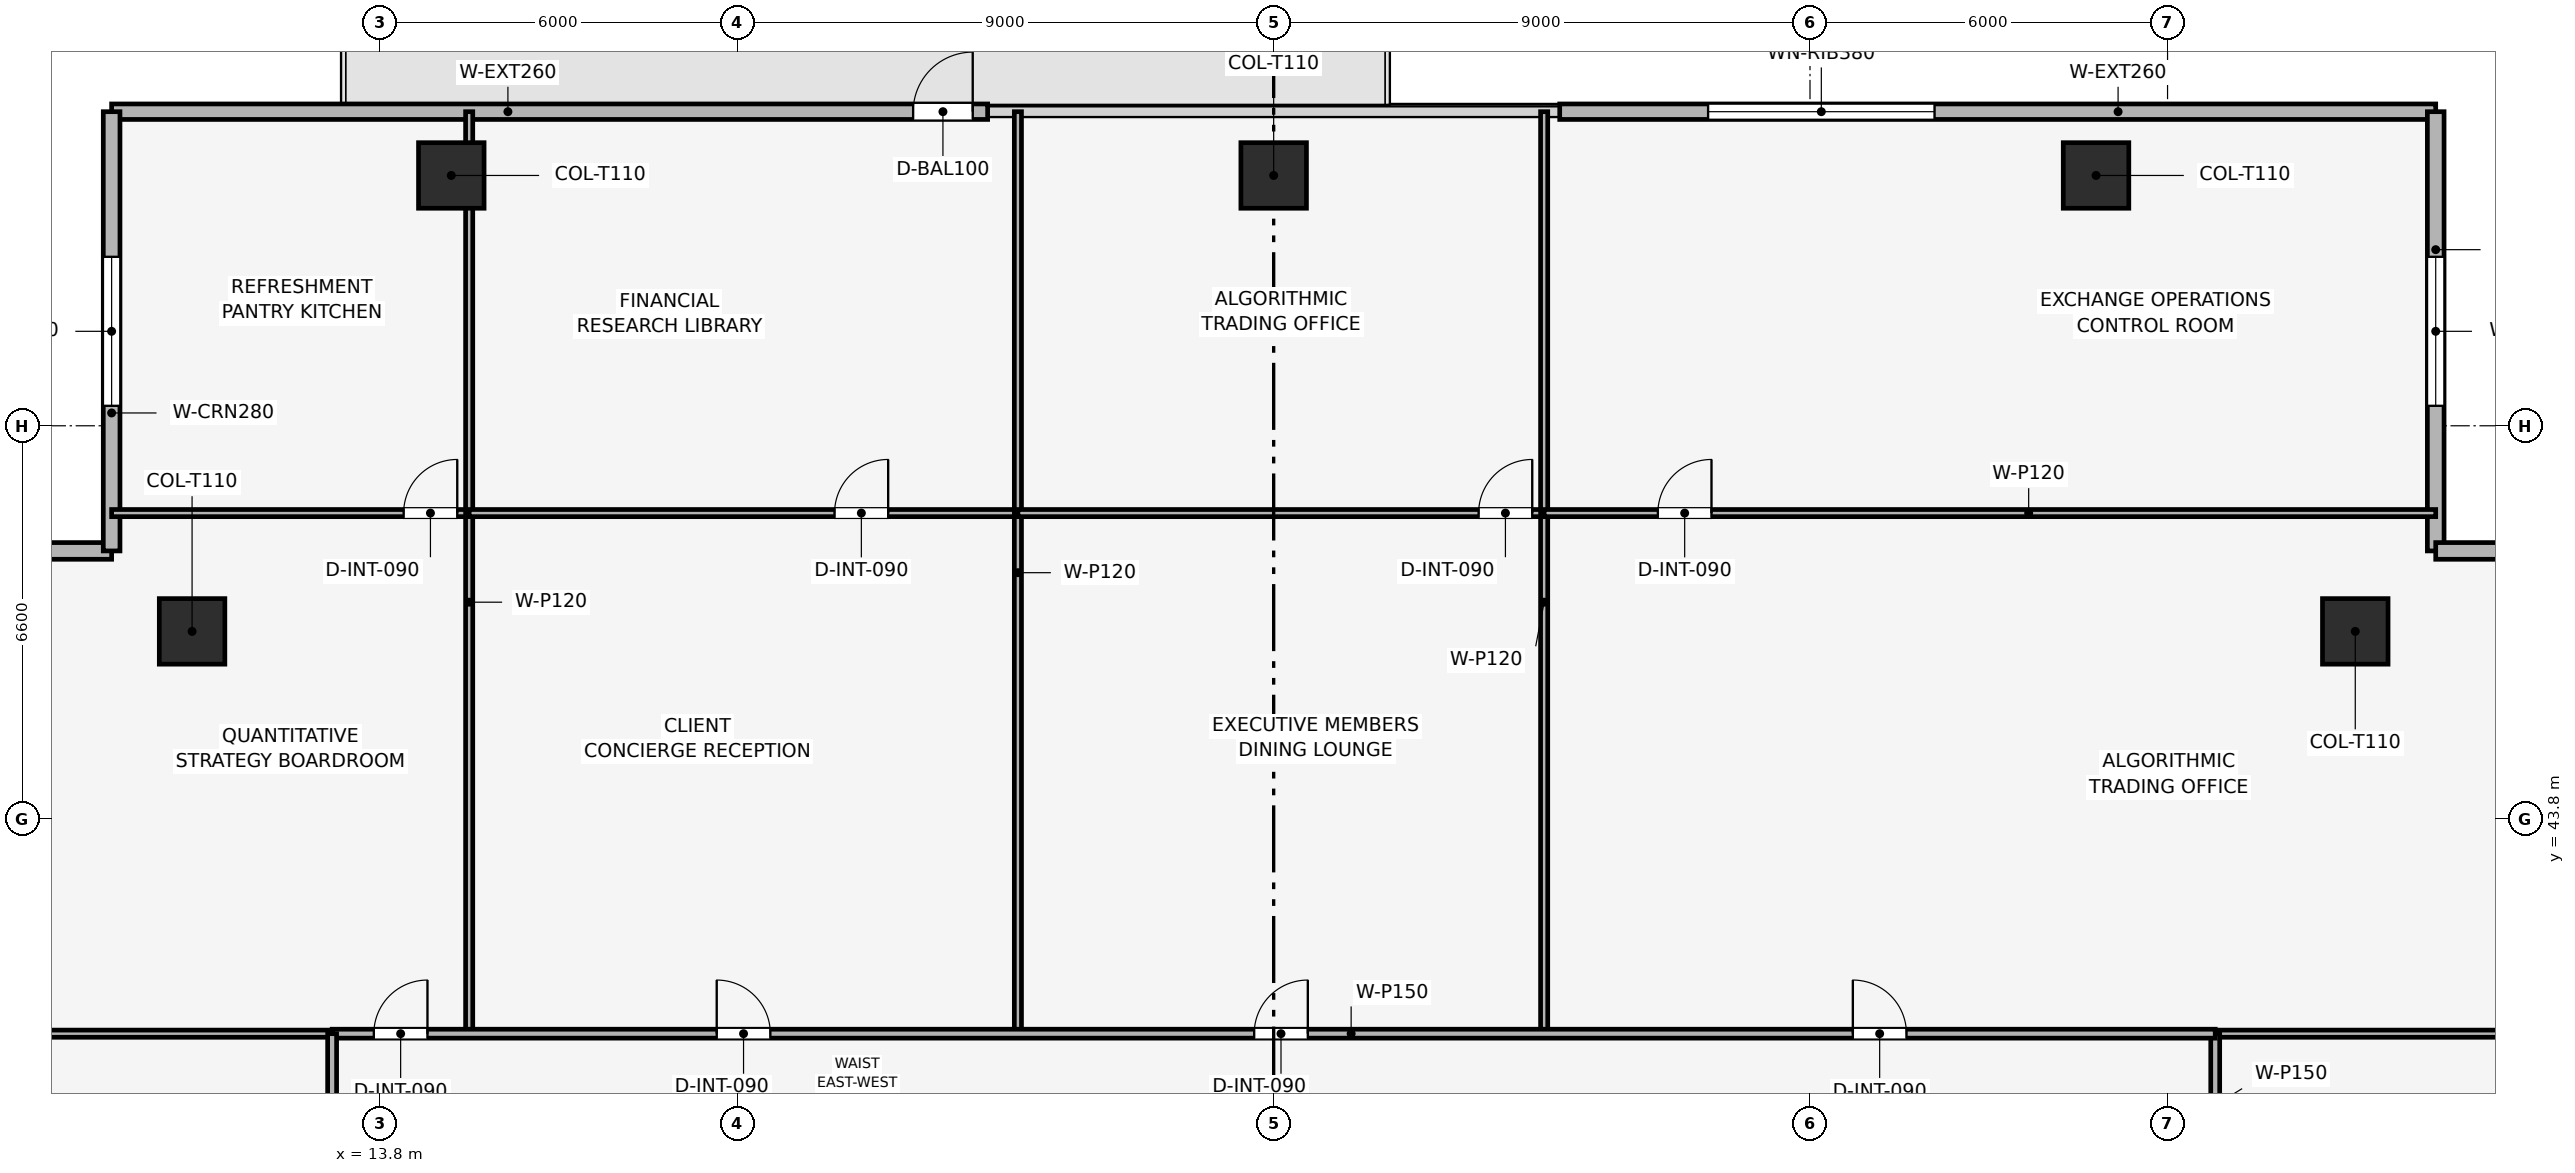
"""IFC4 building model, lengths in metres.
Left out: names, types, materials, properties, quantities, classifications, styles, units other than length and angle.
Written with IfcOpenShell. Run it as: python <this file> out.ifc"""

import sys

from ifc_helpers import new_model, si_unit, direction, frame, frame_2d, origin, origin_2d, place, context, subcontext, project, spatial, rectangle, extrude, element, fill, save


model = new_model("IFC4")
c1 = context("Model", 3, precision=1e-05, world=origin(), true_north=direction((0.0, 1.0)))
c2 = subcontext(c1, "Body", "Model", "MODEL_VIEW")
j1 = project(units=[si_unit("LENGTHUNIT", "METRE"), si_unit("PLANEANGLEUNIT", "RADIAN")], contexts=[c1])
p1 = place(None, origin())
s1 = spatial("IfcSite", under=j1, at=p1, CompositionType="ELEMENT")
p2 = place(p1, origin())
s2 = spatial("IfcBuilding", under=s1, at=p2, CompositionType="ELEMENT")
p3 = place(p2, frame((0.0, 0.0, 233.7)))
s3 = spatial("IfcBuildingStorey", under=s2, at=p3, CompositionType="ELEMENT", Elevation=233.7)
for number, where, z_axis, x_axis in (
    (1, (42.6, 54.6, 0.003), (0.0, 0.0, 1.0), (1.0, 0.0, 0.0)),
    (2, (28.8, 54.6, 0.003), (0.0, 0.0, 1.0), (1.0, 0.0, 0.0)),
    (3, (15.0, 54.6, 0.003), (0.0, 0.0, 1.0), (1.0, 0.0, 0.0)),
    (4, (46.95, 46.95, 0.003), (0.0, 0.0, 1.0), (1.0, 0.0, 0.0)),
    (5, (10.65, 46.95, 0.003), (0.0, 0.0, 1.0), (1.0, 0.0, 0.0)),
):
    element("IfcColumn", number, at=place(p3, frame(where, z_axis=z_axis, x_axis=x_axis)), inside=s3, PredefinedType="COLUMN", context=c2, shape_type="SweptSolid", body=[
        extrude(rectangle(XDim=1.1, YDim=1.1, at=origin_2d()), origin(), (0.0, 0.0, 1.0), 3.494),
    ])
p4 = place(p3, frame((9.3, 55.67, 0.0), z_axis=(0.0, 0.0, 1.0), x_axis=(1.0, 0.0, 0.0)))
e6 = element("IfcWall", 6, at=p4, inside=s3, PredefinedType="SOLIDWALL", context=c2, shape_type="SweptSolid", body=[
    extrude(rectangle(XDim=14.7, YDim=0.26, at=frame_2d((7.35, 0.0))), origin(), (0.0, 0.0, 1.0), 3.5),
])
p5 = place(p4, frame((13.45, 0.0, 0.0)))
e7 = element("IfcOpeningElement", 7, at=p5, cuts=e6, PredefinedType="OPENING", context=c2, shape_type="SweptSolid", body=[
    extrude(rectangle(XDim=1.0, YDim=2.2, at=frame_2d((0.5, 1.1))), frame((0.0, 0.14, 0.0), z_axis=(0.0, -1.0, 0.0), x_axis=(1.0, 0.0, 0.0)), (0.0, 0.0, 1.0), 0.28),
])
p6 = place(p3, frame((33.6, 55.67, 0.0), z_axis=(0.0, 0.0, 1.0), x_axis=(1.0, 0.0, 0.0)))
e8 = element("IfcWall", 8, at=p6, inside=s3, PredefinedType="SOLIDWALL", context=c2, shape_type="SweptSolid", body=[
    extrude(rectangle(XDim=14.7, YDim=0.26, at=frame_2d((7.35, 0.0))), origin(), (0.0, 0.0, 1.0), 3.5),
])
p7 = place(p6, frame((2.49, 0.0, 0.9)))
e9 = element("IfcOpeningElement", 9, at=p7, cuts=e8, PredefinedType="OPENING", context=c2, shape_type="SweptSolid", body=[
    extrude(rectangle(XDim=3.8, YDim=1.9, at=frame_2d((1.9, 0.95))), frame((0.0, 0.14, 0.0), z_axis=(0.0, -1.0, 0.0), x_axis=(1.0, 0.0, 0.0)), (0.0, 0.0, 1.0), 0.28),
])
p8 = place(p3, frame((1.93, 48.3, 0.0), z_axis=(0.0, 0.0, 1.0), x_axis=(1.0, 0.0, 0.0)))
e10 = element("IfcWall", 10, at=p8, inside=s3, PredefinedType="SOLIDWALL", context=c2, shape_type="SweptSolid", body=[
    extrude(rectangle(XDim=7.37, YDim=0.28, at=frame_2d((3.685, 0.0))), origin(), (0.0, 0.0, 1.0), 3.5),
])
p9 = place(p8, frame((2.435, 0.0, 0.9)))
e11 = element("IfcOpeningElement", 11, at=p9, cuts=e10, PredefinedType="OPENING", context=c2, shape_type="SweptSolid", body=[
    extrude(rectangle(XDim=2.5, YDim=1.9, at=frame_2d((1.25, 0.95))), frame((0.0, 0.15, 0.0), z_axis=(0.0, -1.0, 0.0), x_axis=(1.0, 0.0, 0.0)), (0.0, 0.0, 1.0), 0.3),
])
p10 = place(p3, frame((9.3, 48.3, 0.0), z_axis=(0.0, 0.0, 1.0), x_axis=(0.0, 1.0, 0.0)))
e12 = element("IfcWall", 12, at=p10, inside=s3, PredefinedType="SOLIDWALL", context=c2, shape_type="SweptSolid", body=[
    extrude(rectangle(XDim=7.37, YDim=0.28, at=frame_2d((3.685, 0.0))), origin(), (0.0, 0.0, 1.0), 3.5),
])
p11 = place(p10, frame((2.435, 0.0, 0.9)))
e13 = element("IfcOpeningElement", 13, at=p11, cuts=e12, PredefinedType="OPENING", context=c2, shape_type="SweptSolid", body=[
    extrude(rectangle(XDim=2.5, YDim=1.9, at=frame_2d((1.25, 0.95))), frame((0.0, 0.15, 0.0), z_axis=(0.0, -1.0, 0.0), x_axis=(1.0, 0.0, 0.0)), (0.0, 0.0, 1.0), 0.3),
])
p12 = place(p3, frame((48.3, 55.67, 0.0), z_axis=(0.0, 0.0, 1.0), x_axis=(0.0, -1.0, 0.0)))
e14 = element("IfcWall", 14, at=p12, inside=s3, PredefinedType="SOLIDWALL", context=c2, shape_type="SweptSolid", body=[
    extrude(rectangle(XDim=7.37, YDim=0.28, at=frame_2d((3.685, 0.0))), origin(), (0.0, 0.0, 1.0), 3.5),
])
p13 = place(p12, frame((2.435, 0.0, 0.9)))
e15 = element("IfcOpeningElement", 15, at=p13, cuts=e14, PredefinedType="OPENING", context=c2, shape_type="SweptSolid", body=[
    extrude(rectangle(XDim=2.5, YDim=1.9, at=frame_2d((1.25, 0.95))), frame((0.0, 0.15, 0.0), z_axis=(0.0, -1.0, 0.0), x_axis=(1.0, 0.0, 0.0)), (0.0, 0.0, 1.0), 0.3),
])
p14 = place(p3, frame((48.3, 48.3, 0.0), z_axis=(0.0, 0.0, 1.0), x_axis=(1.0, 0.0, 0.0)))
e16 = element("IfcWall", 16, at=p14, inside=s3, PredefinedType="SOLIDWALL", context=c2, shape_type="SweptSolid", body=[
    extrude(rectangle(XDim=7.37, YDim=0.28, at=frame_2d((3.685, 0.0))), origin(), (0.0, 0.0, 1.0), 3.5),
])
p15 = place(p14, frame((2.435, 0.0, 0.9)))
e17 = element("IfcOpeningElement", 17, at=p15, cuts=e16, PredefinedType="OPENING", context=c2, shape_type="SweptSolid", body=[
    extrude(rectangle(XDim=2.5, YDim=1.9, at=frame_2d((1.25, 0.95))), frame((0.0, 0.15, 0.0), z_axis=(0.0, -1.0, 0.0), x_axis=(1.0, 0.0, 0.0)), (0.0, 0.0, 1.0), 0.3),
])
p16 = place(p3, frame((9.3, 48.935, 0.0), z_axis=(0.0, 0.0, 1.0), x_axis=(1.0, 0.0, 0.0)))
e18 = element("IfcWall", 18, at=p16, inside=s3, PredefinedType="PARTITIONING", context=c2, shape_type="SweptSolid", body=[
    extrude(rectangle(XDim=6.0, YDim=0.12, at=frame_2d((3.0, 0.0))), origin(), (0.0, 0.0, 1.0), 2.885),
])
p17 = place(p16, frame((4.9, 0.0, 0.0)))
e19 = element("IfcOpeningElement", 19, at=p17, cuts=e18, PredefinedType="OPENING", context=c2, shape_type="SweptSolid", body=[
    extrude(rectangle(XDim=0.9, YDim=2.1, at=frame_2d((0.45, 1.05))), frame((0.0, 0.07, 0.0), z_axis=(0.0, -1.0, 0.0), x_axis=(1.0, 0.0, 0.0)), (0.0, 0.0, 1.0), 0.14),
])
p18 = place(p3, frame((15.3, 40.2, 0.0), z_axis=(0.0, 0.0, 1.0), x_axis=(0.0, 1.0, 0.0)))
e20 = element("IfcWall", 20, at=p18, inside=s3, PredefinedType="PARTITIONING", context=c2, shape_type="SweptSolid", body=[
    extrude(rectangle(XDim=15.47, YDim=0.12, at=frame_2d((7.735, 0.0))), origin(), (0.0, 0.0, 1.0), 2.885),
])
p19 = place(p3, frame((15.3, 48.935, 0.0), z_axis=(0.0, 0.0, 1.0), x_axis=(1.0, 0.0, 0.0)))
e21 = element("IfcWall", 21, at=p19, inside=s3, PredefinedType="PARTITIONING", context=c2, shape_type="SweptSolid", body=[
    extrude(rectangle(XDim=9.208, YDim=0.12, at=frame_2d((4.604, 0.0))), origin(), (0.0, 0.0, 1.0), 3.035),
])
p20 = place(p19, frame((6.131, 0.0, 0.0)))
e22 = element("IfcOpeningElement", 22, at=p20, cuts=e21, PredefinedType="OPENING", context=c2, shape_type="SweptSolid", body=[
    extrude(rectangle(XDim=0.9, YDim=2.1, at=frame_2d((0.45, 1.05))), frame((0.0, 0.07, 0.0), z_axis=(0.0, -1.0, 0.0), x_axis=(1.0, 0.0, 0.0)), (0.0, 0.0, 1.0), 0.14),
])
p21 = place(p3, frame((24.508, 40.2, 0.0), z_axis=(0.0, 0.0, 1.0), x_axis=(0.0, 1.0, 0.0)))
e23 = element("IfcWall", 23, at=p21, inside=s3, PredefinedType="PARTITIONING", context=c2, shape_type="SweptSolid", body=[
    extrude(rectangle(XDim=15.47, YDim=0.12, at=frame_2d((7.735, 0.0))), origin(), (0.0, 0.0, 1.0), 2.885),
])
p22 = place(p3, frame((24.508, 48.935, 0.0), z_axis=(0.0, 0.0, 1.0), x_axis=(1.0, 0.0, 0.0)))
e24 = element("IfcWall", 24, at=p22, inside=s3, PredefinedType="PARTITIONING", context=c2, shape_type="SweptSolid", body=[
    extrude(rectangle(XDim=8.831, YDim=0.12, at=frame_2d((4.416, 0.0))), origin(), (0.0, 0.0, 1.0), 3.035),
])
p23 = place(p22, frame((7.731, 0.0, 0.0)))
e25 = element("IfcOpeningElement", 25, at=p23, cuts=e24, PredefinedType="OPENING", context=c2, shape_type="SweptSolid", body=[
    extrude(rectangle(XDim=0.9, YDim=2.1, at=frame_2d((0.45, 1.05))), frame((0.0, 0.07, 0.0), z_axis=(0.0, -1.0, 0.0), x_axis=(1.0, 0.0, 0.0)), (0.0, 0.0, 1.0), 0.14),
])
p24 = place(p3, frame((33.339, 40.2, 0.0), z_axis=(0.0, 0.0, 1.0), x_axis=(0.0, 1.0, 0.0)))
e26 = element("IfcWall", 26, at=p24, inside=s3, PredefinedType="PARTITIONING", context=c2, shape_type="SweptSolid", body=[
    extrude(rectangle(XDim=15.47, YDim=0.12, at=frame_2d((7.735, 0.0))), origin(), (0.0, 0.0, 1.0), 2.885),
])
p25 = place(p3, frame((33.339, 48.935, 0.0), z_axis=(0.0, 0.0, 1.0), x_axis=(1.0, 0.0, 0.0)))
e27 = element("IfcWall", 27, at=p25, inside=s3, PredefinedType="PARTITIONING", context=c2, shape_type="SweptSolid", body=[
    extrude(rectangle(XDim=14.961, YDim=0.12, at=frame_2d((7.48, 0.0))), origin(), (0.0, 0.0, 1.0), 2.885),
])
p26 = place(p25, frame((1.908, 0.0, 0.0)))
e28 = element("IfcOpeningElement", 28, at=p26, cuts=e27, PredefinedType="OPENING", context=c2, shape_type="SweptSolid", body=[
    extrude(rectangle(XDim=0.9, YDim=2.1, at=frame_2d((0.45, 1.05))), frame((0.0, 0.07, 0.0), z_axis=(0.0, -1.0, 0.0), x_axis=(1.0, 0.0, 0.0)), (0.0, 0.0, 1.0), 0.14),
])
p27 = place(p3, frame((1.93, 40.2, 0.0), z_axis=(0.0, 0.0, 1.0), x_axis=(1.0, 0.0, 0.0)))
e29 = element("IfcWall", 29, at=p27, inside=s3, PredefinedType="PARTITIONING", context=c2, shape_type="SweptSolid", body=[
    extrude(rectangle(XDim=11.07, YDim=0.12, at=frame_2d((5.535, 0.0))), origin(), (0.0, 0.0, 1.0), 2.885),
])
p28 = place(p3, frame((44.6, 40.2, 0.0), z_axis=(0.0, 0.0, 1.0), x_axis=(1.0, 0.0, 0.0)))
e30 = element("IfcWall", 30, at=p28, inside=s3, PredefinedType="PARTITIONING", context=c2, shape_type="SweptSolid", body=[
    extrude(rectangle(XDim=11.07, YDim=0.12, at=frame_2d((5.535, 0.0))), origin(), (0.0, 0.0, 1.0), 2.885),
])
p29 = place(p3, frame((44.6, 37.8, 0.0), z_axis=(0.0, 0.0, 1.0), x_axis=(0.0, 1.0, 0.0)))
e31 = element("IfcWall", 31, at=p29, inside=s3, PredefinedType="PARTITIONING", context=c2, shape_type="SweptSolid", body=[
    extrude(rectangle(XDim=2.4, YDim=0.15, at=frame_2d((1.2, 0.0))), origin(), (0.0, 0.0, 1.0), 3.5),
])
p30 = place(p3, frame((13.0, 40.2, 0.0), z_axis=(0.0, 0.0, 1.0), x_axis=(1.0, 0.0, 0.0)))
e32 = element("IfcWall", 32, at=p30, inside=s3, PredefinedType="PARTITIONING", context=c2, shape_type="SweptSolid", body=[
    extrude(rectangle(XDim=31.6, YDim=0.15, at=frame_2d((15.8, 0.0))), origin(), (0.0, 0.0, 1.0), 3.035),
])
p31 = place(p30, frame((0.7, 0.0, 0.0)))
e33 = element("IfcOpeningElement", 33, at=p31, cuts=e32, PredefinedType="OPENING", context=c2, shape_type="SweptSolid", body=[
    extrude(rectangle(XDim=0.9, YDim=2.1, at=frame_2d((0.45, 1.05))), frame((0.0, 0.085, 0.0), z_axis=(0.0, -1.0, 0.0), x_axis=(1.0, 0.0, 0.0)), (0.0, 0.0, 1.0), 0.17),
])
p32 = place(p30, frame((6.454, 0.0, 0.0)))
e34 = element("IfcOpeningElement", 34, at=p32, cuts=e32, PredefinedType="OPENING", context=c2, shape_type="SweptSolid", body=[
    extrude(rectangle(XDim=0.9, YDim=2.1, at=frame_2d((0.45, 1.05))), frame((0.0, 0.085, 0.0), z_axis=(0.0, -1.0, 0.0), x_axis=(1.0, 0.0, 0.0)), (0.0, 0.0, 1.0), 0.17),
])
p33 = place(p30, frame((15.473, 0.0, 0.0)))
e35 = element("IfcOpeningElement", 35, at=p33, cuts=e32, PredefinedType="OPENING", context=c2, shape_type="SweptSolid", body=[
    extrude(rectangle(XDim=0.9, YDim=2.1, at=frame_2d((0.45, 1.05))), frame((0.0, 0.085, 0.0), z_axis=(0.0, -1.0, 0.0), x_axis=(1.0, 0.0, 0.0)), (0.0, 0.0, 1.0), 0.17),
])
p34 = place(p30, frame((25.519, 0.0, 0.0)))
e36 = element("IfcOpeningElement", 36, at=p34, cuts=e32, PredefinedType="OPENING", context=c2, shape_type="SweptSolid", body=[
    extrude(rectangle(XDim=0.9, YDim=2.1, at=frame_2d((0.45, 1.05))), frame((0.0, 0.085, 0.0), z_axis=(0.0, -1.0, 0.0), x_axis=(1.0, 0.0, 0.0)), (0.0, 0.0, 1.0), 0.17),
])
p35 = place(p3, frame((13.0, 17.4, 0.0), z_axis=(0.0, 0.0, 1.0), x_axis=(0.0, 1.0, 0.0)))
e37 = element("IfcWall", 37, at=p35, inside=s3, PredefinedType="PARTITIONING", context=c2, shape_type="SweptSolid", body=[
    extrude(rectangle(XDim=22.8, YDim=0.15, at=frame_2d((11.4, 0.0))), origin(), (0.0, 0.0, 1.0), 3.035),
])
p36 = place(p35, frame((4.641, 0.0, 0.0)))
e38 = element("IfcOpeningElement", 38, at=p36, cuts=e37, PredefinedType="OPENING", context=c2, shape_type="SweptSolid", body=[
    extrude(rectangle(XDim=0.9, YDim=2.1, at=frame_2d((0.45, 1.05))), frame((0.0, 0.085, 0.0), z_axis=(0.0, -1.0, 0.0), x_axis=(1.0, 0.0, 0.0)), (0.0, 0.0, 1.0), 0.17),
])
p37 = place(p35, frame((13.641, 0.0, 0.0)))
e39 = element("IfcOpeningElement", 39, at=p37, cuts=e37, PredefinedType="OPENING", context=c2, shape_type="SweptSolid", body=[
    extrude(rectangle(XDim=0.9, YDim=2.1, at=frame_2d((0.45, 1.05))), frame((0.0, 0.085, 0.0), z_axis=(0.0, -1.0, 0.0), x_axis=(1.0, 0.0, 0.0)), (0.0, 0.0, 1.0), 0.17),
])
p38 = place(p5, origin())
e40 = element("IfcDoor", 40, at=p38, inside=s3, OperationType="SINGLE_SWING_RIGHT", PredefinedType="DOOR", context=c2, shape_type="SweptSolid", body=[
    extrude(rectangle(XDim=1.0, YDim=2.2, at=frame_2d((0.5, 1.1))), frame((0.0, 0.025, 0.0), z_axis=(0.0, -1.0, 0.0), x_axis=(1.0, 0.0, 0.0)), (0.0, 0.0, 1.0), 0.05),
])
fill(e7, e40)
p39 = place(p7, origin())
e41 = element("IfcWindow", 41, at=p39, inside=s3, PartitioningType="SINGLE_PANEL", PredefinedType="WINDOW", context=c2, shape_type="SweptSolid", body=[
    extrude(rectangle(XDim=3.8, YDim=1.9, at=frame_2d((1.9, 0.95))), frame((0.0, 0.03, 0.0), z_axis=(0.0, -1.0, 0.0), x_axis=(1.0, 0.0, 0.0)), (0.0, 0.0, 1.0), 0.06),
])
fill(e9, e41)
p40 = place(p11, origin())
e42 = element("IfcWindow", 42, at=p40, inside=s3, PartitioningType="SINGLE_PANEL", PredefinedType="WINDOW", context=c2, shape_type="SweptSolid", body=[
    extrude(rectangle(XDim=2.5, YDim=1.9, at=frame_2d((1.25, 0.95))), frame((0.0, 0.03, 0.0), z_axis=(0.0, -1.0, 0.0), x_axis=(1.0, 0.0, 0.0)), (0.0, 0.0, 1.0), 0.06),
])
fill(e13, e42)
p41 = place(p13, origin())
e43 = element("IfcWindow", 43, at=p41, inside=s3, PartitioningType="SINGLE_PANEL", PredefinedType="WINDOW", context=c2, shape_type="SweptSolid", body=[
    extrude(rectangle(XDim=2.5, YDim=1.9, at=frame_2d((1.25, 0.95))), frame((0.0, 0.03, 0.0), z_axis=(0.0, -1.0, 0.0), x_axis=(1.0, 0.0, 0.0)), (0.0, 0.0, 1.0), 0.06),
])
fill(e15, e43)
p42 = place(p17, origin())
e44 = element("IfcDoor", 44, at=p42, inside=s3, OperationType="SINGLE_SWING_RIGHT", PredefinedType="DOOR", context=c2, shape_type="SweptSolid", body=[
    extrude(rectangle(XDim=0.9, YDim=2.1, at=frame_2d((0.45, 1.05))), frame((0.0, 0.025, 0.0), z_axis=(0.0, -1.0, 0.0), x_axis=(1.0, 0.0, 0.0)), (0.0, 0.0, 1.0), 0.05),
])
fill(e19, e44)
p43 = place(p20, origin())
e45 = element("IfcDoor", 45, at=p43, inside=s3, OperationType="SINGLE_SWING_RIGHT", PredefinedType="DOOR", context=c2, shape_type="SweptSolid", body=[
    extrude(rectangle(XDim=0.9, YDim=2.1, at=frame_2d((0.45, 1.05))), frame((0.0, 0.025, 0.0), z_axis=(0.0, -1.0, 0.0), x_axis=(1.0, 0.0, 0.0)), (0.0, 0.0, 1.0), 0.05),
])
fill(e22, e45)
p44 = place(p23, origin())
e46 = element("IfcDoor", 46, at=p44, inside=s3, OperationType="SINGLE_SWING_RIGHT", PredefinedType="DOOR", context=c2, shape_type="SweptSolid", body=[
    extrude(rectangle(XDim=0.9, YDim=2.1, at=frame_2d((0.45, 1.05))), frame((0.0, 0.025, 0.0), z_axis=(0.0, -1.0, 0.0), x_axis=(1.0, 0.0, 0.0)), (0.0, 0.0, 1.0), 0.05),
])
fill(e25, e46)
p45 = place(p26, origin())
e47 = element("IfcDoor", 47, at=p45, inside=s3, OperationType="SINGLE_SWING_RIGHT", PredefinedType="DOOR", context=c2, shape_type="SweptSolid", body=[
    extrude(rectangle(XDim=0.9, YDim=2.1, at=frame_2d((0.45, 1.05))), frame((0.0, 0.025, 0.0), z_axis=(0.0, -1.0, 0.0), x_axis=(1.0, 0.0, 0.0)), (0.0, 0.0, 1.0), 0.05),
])
fill(e28, e47)
p46 = place(p31, origin())
e48 = element("IfcDoor", 48, at=p46, inside=s3, OperationType="SINGLE_SWING_RIGHT", PredefinedType="DOOR", context=c2, shape_type="SweptSolid", body=[
    extrude(rectangle(XDim=0.9, YDim=2.1, at=frame_2d((0.45, 1.05))), frame((0.0, 0.025, 0.0), z_axis=(0.0, -1.0, 0.0), x_axis=(1.0, 0.0, 0.0)), (0.0, 0.0, 1.0), 0.05),
])
fill(e33, e48)
p47 = place(p32, origin())
e49 = element("IfcDoor", 49, at=p47, inside=s3, OperationType="SINGLE_SWING_LEFT", PredefinedType="DOOR", context=c2, shape_type="SweptSolid", body=[
    extrude(rectangle(XDim=0.9, YDim=2.1, at=frame_2d((0.45, 1.05))), frame((0.0, 0.025, 0.0), z_axis=(0.0, -1.0, 0.0), x_axis=(1.0, 0.0, 0.0)), (0.0, 0.0, 1.0), 0.05),
])
fill(e34, e49)
p48 = place(p33, origin())
e50 = element("IfcDoor", 50, at=p48, inside=s3, OperationType="SINGLE_SWING_RIGHT", PredefinedType="DOOR", context=c2, shape_type="SweptSolid", body=[
    extrude(rectangle(XDim=0.9, YDim=2.1, at=frame_2d((0.45, 1.05))), frame((0.0, 0.025, 0.0), z_axis=(0.0, -1.0, 0.0), x_axis=(1.0, 0.0, 0.0)), (0.0, 0.0, 1.0), 0.05),
])
fill(e35, e50)
p49 = place(p34, origin())
e51 = element("IfcDoor", 51, at=p49, inside=s3, OperationType="SINGLE_SWING_LEFT", PredefinedType="DOOR", context=c2, shape_type="SweptSolid", body=[
    extrude(rectangle(XDim=0.9, YDim=2.1, at=frame_2d((0.45, 1.05))), frame((0.0, 0.025, 0.0), z_axis=(0.0, -1.0, 0.0), x_axis=(1.0, 0.0, 0.0)), (0.0, 0.0, 1.0), 0.05),
])
fill(e36, e51)
save(model, sys.argv[1])
